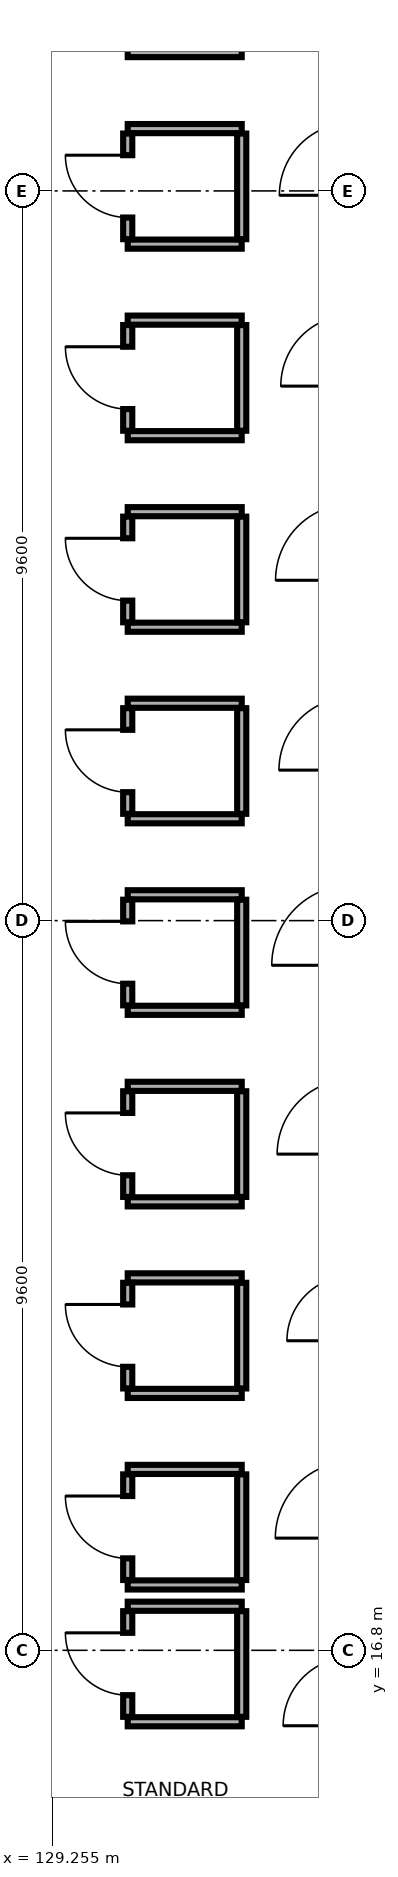
"""IFC4 building model, lengths in metres.
Left out: names, types, materials, properties, quantities, classifications, styles, units other than length and angle.
Written with IfcOpenShell. Run it as: python <this file> out.ifc"""

import sys

from ifc_helpers import new_model, si_unit, direction, frame, frame_2d, origin, place, context, subcontext, project, spatial, rectangle, extrude, element, fill, save


model = new_model("IFC4")
c1 = context("Model", 3, precision=1e-05, world=origin(), true_north=direction((0.0, 1.0)))
c2 = subcontext(c1, "Body", "Model", "MODEL_VIEW")
j1 = project(units=[si_unit("LENGTHUNIT", "METRE"), si_unit("PLANEANGLEUNIT", "RADIAN")], contexts=[c1])
p1 = place(None, origin())
s1 = spatial("IfcSite", under=j1, at=p1, CompositionType="ELEMENT")
p2 = place(p1, origin())
s2 = spatial("IfcBuilding", under=s1, at=p2, CompositionType="ELEMENT")
p3 = place(p2, frame((0.0, 0.0, 14.7)))
s3 = spatial("IfcBuildingStorey", under=s2, at=p3, CompositionType="ELEMENT", Elevation=14.7)
p4 = place(p3, frame((127.916, 15.27, 0.0), z_axis=(0.0, 0.0, 1.0), x_axis=(0.707089356394, -0.707124205549, 0.0)))
e1 = element("IfcWall", 1, at=p4, inside=s3, PredefinedType="SOLIDWALL", context=c2, shape_type="SweptSolid", body=[
    extrude(rectangle(XDim=7.006, YDim=0.3, at=frame_2d((3.503, 0.0))), origin(), (0.0, 0.0, 1.0), 3.215),
])
p5 = place(p4, frame((4.746, 0.0, 0.8)))
e2 = element("IfcOpeningElement", 2, at=p5, cuts=e1, PredefinedType="OPENING", context=c2, shape_type="SweptSolid", body=[
    extrude(rectangle(XDim=1.6, YDim=1.5, at=frame_2d((0.8, 0.75))), frame((0.0, 0.16, 0.0), z_axis=(0.0, -1.0, 0.0), x_axis=(1.0, 0.0, 0.0)), (0.0, 0.0, 1.0), 0.32),
])
p6 = place(p4, frame((1.083, 0.0, 0.8)))
e3 = element("IfcOpeningElement", 3, at=p6, cuts=e1, PredefinedType="OPENING", context=c2, shape_type="SweptSolid", body=[
    extrude(rectangle(XDim=1.6, YDim=1.5, at=frame_2d((0.8, 0.75))), frame((0.0, 0.16, 0.0), z_axis=(0.0, -1.0, 0.0), x_axis=(1.0, 0.0, 0.0)), (0.0, 0.0, 1.0), 0.32),
])
p7 = place(p3, frame((133.2, 15.0, 0.0), z_axis=(0.0, 0.0, 1.0), x_axis=(-0.707106781187, -0.707106781187, 0.0)))
e4 = element("IfcWall", 4, at=p7, inside=s3, PredefinedType="PARTITIONING", context=c2, shape_type="SweptSolid", body=[
    extrude(rectangle(XDim=3.789, YDim=0.18, at=frame_2d((1.894, 0.0))), origin(), (0.0, 0.0, 1.0), 2.76),
])
for number, where, z_axis, x_axis in (
    (5, (130.25, 37.82, 0.0), (0.0, 0.0, 1.0), (1.0, 0.0, 0.0)),
    (6, (130.25, 35.3, 0.0), (0.0, 0.0, 1.0), (1.0, 0.0, 0.0)),
    (7, (130.25, 36.82, 0.0), (0.0, 0.0, 1.0), (1.0, 0.0, 0.0)),
):
    element("IfcWall", number, at=place(p3, frame(where, z_axis=z_axis, x_axis=x_axis)), inside=s3, PredefinedType="PARTITIONING", context=c2, shape_type="SweptSolid", body=[
        extrude(rectangle(XDim=1.5, YDim=0.12, at=frame_2d((0.75, 0.0))), origin(), (0.0, 0.0, 1.0), 3.215),
    ])
p8 = place(p3, frame((130.25, 35.365, 0.0), z_axis=(0.0, 0.0, 1.0), x_axis=(0.0, 1.0, 0.0)))
e8 = element("IfcWall", 8, at=p8, inside=s3, PredefinedType="PARTITIONING", context=c2, shape_type="SweptSolid", body=[
    extrude(rectangle(XDim=1.39, YDim=0.12, at=frame_2d((0.695, 0.0))), origin(), (0.0, 0.0, 1.0), 3.215),
])
p9 = place(p8, frame((0.285, 0.0, 0.0)))
e9 = element("IfcOpeningElement", 9, at=p9, cuts=e8, PredefinedType="OPENING", context=c2, shape_type="SweptSolid", body=[
    extrude(rectangle(XDim=0.82, YDim=2.08, at=frame_2d((0.41, 1.04))), frame((0.0, 0.07, 0.0), z_axis=(0.0, -1.0, 0.0), x_axis=(1.0, 0.0, 0.0)), (0.0, 0.0, 1.0), 0.14),
])
p10 = place(p3, frame((131.75, 35.365, 0.0), z_axis=(0.0, 0.0, 1.0), x_axis=(0.0, 1.0, 0.0)))
e10 = element("IfcWall", 10, at=p10, inside=s3, PredefinedType="PARTITIONING", context=c2, shape_type="SweptSolid", body=[
    extrude(rectangle(XDim=1.39, YDim=0.12, at=frame_2d((0.695, 0.0))), origin(), (0.0, 0.0, 1.0), 3.215),
])
for number, where, z_axis, x_axis in (
    (11, (130.25, 32.78, 0.0), (0.0, 0.0, 1.0), (1.0, 0.0, 0.0)),
    (12, (130.25, 34.3, 0.0), (0.0, 0.0, 1.0), (1.0, 0.0, 0.0)),
):
    element("IfcWall", number, at=place(p3, frame(where, z_axis=z_axis, x_axis=x_axis)), inside=s3, PredefinedType="PARTITIONING", context=c2, shape_type="SweptSolid", body=[
        extrude(rectangle(XDim=1.5, YDim=0.12, at=frame_2d((0.75, 0.0))), origin(), (0.0, 0.0, 1.0), 3.215),
    ])
p11 = place(p3, frame((130.25, 32.845, 0.0), z_axis=(0.0, 0.0, 1.0), x_axis=(0.0, 1.0, 0.0)))
e13 = element("IfcWall", 13, at=p11, inside=s3, PredefinedType="PARTITIONING", context=c2, shape_type="SweptSolid", body=[
    extrude(rectangle(XDim=1.39, YDim=0.12, at=frame_2d((0.695, 0.0))), origin(), (0.0, 0.0, 1.0), 3.215),
])
p12 = place(p11, frame((0.285, 0.0, 0.0)))
e14 = element("IfcOpeningElement", 14, at=p12, cuts=e13, PredefinedType="OPENING", context=c2, shape_type="SweptSolid", body=[
    extrude(rectangle(XDim=0.82, YDim=2.08, at=frame_2d((0.41, 1.04))), frame((0.0, 0.07, 0.0), z_axis=(0.0, -1.0, 0.0), x_axis=(1.0, 0.0, 0.0)), (0.0, 0.0, 1.0), 0.14),
])
p13 = place(p3, frame((131.75, 32.845, 0.0), z_axis=(0.0, 0.0, 1.0), x_axis=(0.0, 1.0, 0.0)))
e15 = element("IfcWall", 15, at=p13, inside=s3, PredefinedType="PARTITIONING", context=c2, shape_type="SweptSolid", body=[
    extrude(rectangle(XDim=1.39, YDim=0.12, at=frame_2d((0.695, 0.0))), origin(), (0.0, 0.0, 1.0), 3.215),
])
for number, where, z_axis, x_axis in (
    (16, (130.25, 30.26, 0.0), (0.0, 0.0, 1.0), (1.0, 0.0, 0.0)),
    (17, (130.25, 31.78, 0.0), (0.0, 0.0, 1.0), (1.0, 0.0, 0.0)),
):
    element("IfcWall", number, at=place(p3, frame(where, z_axis=z_axis, x_axis=x_axis)), inside=s3, PredefinedType="PARTITIONING", context=c2, shape_type="SweptSolid", body=[
        extrude(rectangle(XDim=1.5, YDim=0.12, at=frame_2d((0.75, 0.0))), origin(), (0.0, 0.0, 1.0), 3.215),
    ])
p14 = place(p3, frame((130.25, 30.325, 0.0), z_axis=(0.0, 0.0, 1.0), x_axis=(0.0, 1.0, 0.0)))
e18 = element("IfcWall", 18, at=p14, inside=s3, PredefinedType="PARTITIONING", context=c2, shape_type="SweptSolid", body=[
    extrude(rectangle(XDim=1.39, YDim=0.12, at=frame_2d((0.695, 0.0))), origin(), (0.0, 0.0, 1.0), 2.75),
])
p15 = place(p14, frame((0.285, 0.0, 0.0)))
e19 = element("IfcOpeningElement", 19, at=p15, cuts=e18, PredefinedType="OPENING", context=c2, shape_type="SweptSolid", body=[
    extrude(rectangle(XDim=0.82, YDim=2.08, at=frame_2d((0.41, 1.04))), frame((0.0, 0.07, 0.0), z_axis=(0.0, -1.0, 0.0), x_axis=(1.0, 0.0, 0.0)), (0.0, 0.0, 1.0), 0.14),
])
p16 = place(p3, frame((131.75, 30.325, 0.0), z_axis=(0.0, 0.0, 1.0), x_axis=(0.0, 1.0, 0.0)))
e20 = element("IfcWall", 20, at=p16, inside=s3, PredefinedType="PARTITIONING", context=c2, shape_type="SweptSolid", body=[
    extrude(rectangle(XDim=1.39, YDim=0.12, at=frame_2d((0.695, 0.0))), origin(), (0.0, 0.0, 1.0), 2.75),
])
for number, where, z_axis, x_axis in (
    (21, (130.25, 27.74, 0.0), (0.0, 0.0, 1.0), (1.0, 0.0, 0.0)),
    (22, (130.25, 29.26, 0.0), (0.0, 0.0, 1.0), (1.0, 0.0, 0.0)),
):
    element("IfcWall", number, at=place(p3, frame(where, z_axis=z_axis, x_axis=x_axis)), inside=s3, PredefinedType="PARTITIONING", context=c2, shape_type="SweptSolid", body=[
        extrude(rectangle(XDim=1.5, YDim=0.12, at=frame_2d((0.75, 0.0))), origin(), (0.0, 0.0, 1.0), 3.215),
    ])
p17 = place(p3, frame((130.25, 27.805, 0.0), z_axis=(0.0, 0.0, 1.0), x_axis=(0.0, 1.0, 0.0)))
e23 = element("IfcWall", 23, at=p17, inside=s3, PredefinedType="PARTITIONING", context=c2, shape_type="SweptSolid", body=[
    extrude(rectangle(XDim=1.39, YDim=0.12, at=frame_2d((0.695, 0.0))), origin(), (0.0, 0.0, 1.0), 3.215),
])
p18 = place(p17, frame((0.285, 0.0, 0.0)))
e24 = element("IfcOpeningElement", 24, at=p18, cuts=e23, PredefinedType="OPENING", context=c2, shape_type="SweptSolid", body=[
    extrude(rectangle(XDim=0.82, YDim=2.08, at=frame_2d((0.41, 1.04))), frame((0.0, 0.07, 0.0), z_axis=(0.0, -1.0, 0.0), x_axis=(1.0, 0.0, 0.0)), (0.0, 0.0, 1.0), 0.14),
])
p19 = place(p3, frame((131.75, 27.805, 0.0), z_axis=(0.0, 0.0, 1.0), x_axis=(0.0, 1.0, 0.0)))
e25 = element("IfcWall", 25, at=p19, inside=s3, PredefinedType="PARTITIONING", context=c2, shape_type="SweptSolid", body=[
    extrude(rectangle(XDim=1.39, YDim=0.12, at=frame_2d((0.695, 0.0))), origin(), (0.0, 0.0, 1.0), 3.215),
])
for number, where, z_axis, x_axis in (
    (26, (130.25, 25.22, 0.0), (0.0, 0.0, 1.0), (1.0, 0.0, 0.0)),
    (27, (130.25, 26.74, 0.0), (0.0, 0.0, 1.0), (1.0, 0.0, 0.0)),
):
    element("IfcWall", number, at=place(p3, frame(where, z_axis=z_axis, x_axis=x_axis)), inside=s3, PredefinedType="PARTITIONING", context=c2, shape_type="SweptSolid", body=[
        extrude(rectangle(XDim=1.5, YDim=0.12, at=frame_2d((0.75, 0.0))), origin(), (0.0, 0.0, 1.0), 3.215),
    ])
p20 = place(p3, frame((130.25, 25.285, 0.0), z_axis=(0.0, 0.0, 1.0), x_axis=(0.0, 1.0, 0.0)))
e28 = element("IfcWall", 28, at=p20, inside=s3, PredefinedType="PARTITIONING", context=c2, shape_type="SweptSolid", body=[
    extrude(rectangle(XDim=1.39, YDim=0.12, at=frame_2d((0.695, 0.0))), origin(), (0.0, 0.0, 1.0), 3.215),
])
p21 = place(p20, frame((0.285, 0.0, 0.0)))
e29 = element("IfcOpeningElement", 29, at=p21, cuts=e28, PredefinedType="OPENING", context=c2, shape_type="SweptSolid", body=[
    extrude(rectangle(XDim=0.82, YDim=2.08, at=frame_2d((0.41, 1.04))), frame((0.0, 0.07, 0.0), z_axis=(0.0, -1.0, 0.0), x_axis=(1.0, 0.0, 0.0)), (0.0, 0.0, 1.0), 0.14),
])
p22 = place(p3, frame((131.75, 25.285, 0.0), z_axis=(0.0, 0.0, 1.0), x_axis=(0.0, 1.0, 0.0)))
e30 = element("IfcWall", 30, at=p22, inside=s3, PredefinedType="PARTITIONING", context=c2, shape_type="SweptSolid", body=[
    extrude(rectangle(XDim=1.39, YDim=0.12, at=frame_2d((0.695, 0.0))), origin(), (0.0, 0.0, 1.0), 3.215),
])
p23 = place(p3, frame((130.25, 22.7, 0.0), z_axis=(0.0, 0.0, 1.0), x_axis=(1.0, 0.0, 0.0)))
e31 = element("IfcWall", 31, at=p23, inside=s3, PredefinedType="PARTITIONING", context=c2, shape_type="SweptSolid", body=[
    extrude(rectangle(XDim=1.5, YDim=0.12, at=frame_2d((0.75, 0.0))), origin(), (0.0, 0.0, 1.0), 3.215),
])
p24 = place(p3, frame((130.25, 24.22, 0.0), z_axis=(0.0, 0.0, 1.0), x_axis=(1.0, 0.0, 0.0)))
e32 = element("IfcWall", 32, at=p24, inside=s3, PredefinedType="PARTITIONING", context=c2, shape_type="SweptSolid", body=[
    extrude(rectangle(XDim=1.5, YDim=0.12, at=frame_2d((0.75, 0.0))), origin(), (0.0, 0.0, 1.0), 2.75),
])
p25 = place(p3, frame((130.25, 22.765, 0.0), z_axis=(0.0, 0.0, 1.0), x_axis=(0.0, 1.0, 0.0)))
e33 = element("IfcWall", 33, at=p25, inside=s3, PredefinedType="PARTITIONING", context=c2, shape_type="SweptSolid", body=[
    extrude(rectangle(XDim=1.39, YDim=0.12, at=frame_2d((0.695, 0.0))), origin(), (0.0, 0.0, 1.0), 2.75),
])
p26 = place(p25, frame((0.285, 0.0, 0.0)))
e34 = element("IfcOpeningElement", 34, at=p26, cuts=e33, PredefinedType="OPENING", context=c2, shape_type="SweptSolid", body=[
    extrude(rectangle(XDim=0.82, YDim=2.08, at=frame_2d((0.41, 1.04))), frame((0.0, 0.07, 0.0), z_axis=(0.0, -1.0, 0.0), x_axis=(1.0, 0.0, 0.0)), (0.0, 0.0, 1.0), 0.14),
])
p27 = place(p3, frame((131.75, 22.765, 0.0), z_axis=(0.0, 0.0, 1.0), x_axis=(0.0, 1.0, 0.0)))
e35 = element("IfcWall", 35, at=p27, inside=s3, PredefinedType="PARTITIONING", context=c2, shape_type="SweptSolid", body=[
    extrude(rectangle(XDim=1.39, YDim=0.12, at=frame_2d((0.695, 0.0))), origin(), (0.0, 0.0, 1.0), 2.75),
])
for number, where, z_axis, x_axis in (
    (36, (130.25, 20.18, 0.0), (0.0, 0.0, 1.0), (1.0, 0.0, 0.0)),
    (37, (130.25, 21.7, 0.0), (0.0, 0.0, 1.0), (1.0, 0.0, 0.0)),
):
    element("IfcWall", number, at=place(p3, frame(where, z_axis=z_axis, x_axis=x_axis)), inside=s3, PredefinedType="PARTITIONING", context=c2, shape_type="SweptSolid", body=[
        extrude(rectangle(XDim=1.5, YDim=0.12, at=frame_2d((0.75, 0.0))), origin(), (0.0, 0.0, 1.0), 3.215),
    ])
p28 = place(p3, frame((130.25, 20.245, 0.0), z_axis=(0.0, 0.0, 1.0), x_axis=(0.0, 1.0, 0.0)))
e38 = element("IfcWall", 38, at=p28, inside=s3, PredefinedType="PARTITIONING", context=c2, shape_type="SweptSolid", body=[
    extrude(rectangle(XDim=1.39, YDim=0.12, at=frame_2d((0.695, 0.0))), origin(), (0.0, 0.0, 1.0), 3.215),
])
p29 = place(p28, frame((0.285, 0.0, 0.0)))
e39 = element("IfcOpeningElement", 39, at=p29, cuts=e38, PredefinedType="OPENING", context=c2, shape_type="SweptSolid", body=[
    extrude(rectangle(XDim=0.82, YDim=2.08, at=frame_2d((0.41, 1.04))), frame((0.0, 0.07, 0.0), z_axis=(0.0, -1.0, 0.0), x_axis=(1.0, 0.0, 0.0)), (0.0, 0.0, 1.0), 0.14),
])
p30 = place(p3, frame((131.75, 20.245, 0.0), z_axis=(0.0, 0.0, 1.0), x_axis=(0.0, 1.0, 0.0)))
e40 = element("IfcWall", 40, at=p30, inside=s3, PredefinedType="PARTITIONING", context=c2, shape_type="SweptSolid", body=[
    extrude(rectangle(XDim=1.39, YDim=0.12, at=frame_2d((0.695, 0.0))), origin(), (0.0, 0.0, 1.0), 3.215),
])
for number, where, z_axis, x_axis in (
    (41, (130.25, 17.66, 0.0), (0.0, 0.0, 1.0), (1.0, 0.0, 0.0)),
    (42, (130.25, 19.18, 0.0), (0.0, 0.0, 1.0), (1.0, 0.0, 0.0)),
):
    element("IfcWall", number, at=place(p3, frame(where, z_axis=z_axis, x_axis=x_axis)), inside=s3, PredefinedType="PARTITIONING", context=c2, shape_type="SweptSolid", body=[
        extrude(rectangle(XDim=1.5, YDim=0.12, at=frame_2d((0.75, 0.0))), origin(), (0.0, 0.0, 1.0), 3.215),
    ])
p31 = place(p3, frame((130.25, 17.725, 0.0), z_axis=(0.0, 0.0, 1.0), x_axis=(0.0, 1.0, 0.0)))
e43 = element("IfcWall", 43, at=p31, inside=s3, PredefinedType="PARTITIONING", context=c2, shape_type="SweptSolid", body=[
    extrude(rectangle(XDim=1.39, YDim=0.12, at=frame_2d((0.695, 0.0))), origin(), (0.0, 0.0, 1.0), 3.215),
])
p32 = place(p31, frame((0.285, 0.0, 0.0)))
e44 = element("IfcOpeningElement", 44, at=p32, cuts=e43, PredefinedType="OPENING", context=c2, shape_type="SweptSolid", body=[
    extrude(rectangle(XDim=0.82, YDim=2.08, at=frame_2d((0.41, 1.04))), frame((0.0, 0.07, 0.0), z_axis=(0.0, -1.0, 0.0), x_axis=(1.0, 0.0, 0.0)), (0.0, 0.0, 1.0), 0.14),
])
p33 = place(p3, frame((131.75, 17.725, 0.0), z_axis=(0.0, 0.0, 1.0), x_axis=(0.0, 1.0, 0.0)))
e45 = element("IfcWall", 45, at=p33, inside=s3, PredefinedType="PARTITIONING", context=c2, shape_type="SweptSolid", body=[
    extrude(rectangle(XDim=1.39, YDim=0.12, at=frame_2d((0.695, 0.0))), origin(), (0.0, 0.0, 1.0), 3.215),
])
for number, where, z_axis, x_axis in (
    (46, (130.25, 15.86, 0.0), (0.0, 0.0, 1.0), (1.0, 0.0, 0.0)),
    (47, (130.25, 17.38, 0.0), (0.0, 0.0, 1.0), (1.0, 0.0, 0.0)),
):
    element("IfcWall", number, at=place(p3, frame(where, z_axis=z_axis, x_axis=x_axis)), inside=s3, PredefinedType="PARTITIONING", context=c2, shape_type="SweptSolid", body=[
        extrude(rectangle(XDim=1.5, YDim=0.12, at=frame_2d((0.75, 0.0))), origin(), (0.0, 0.0, 1.0), 3.215),
    ])
p34 = place(p3, frame((130.25, 15.925, 0.0), z_axis=(0.0, 0.0, 1.0), x_axis=(0.0, 1.0, 0.0)))
e48 = element("IfcWall", 48, at=p34, inside=s3, PredefinedType="PARTITIONING", context=c2, shape_type="SweptSolid", body=[
    extrude(rectangle(XDim=1.39, YDim=0.12, at=frame_2d((0.695, 0.0))), origin(), (0.0, 0.0, 1.0), 2.75),
])
p35 = place(p34, frame((0.285, 0.0, 0.0)))
e49 = element("IfcOpeningElement", 49, at=p35, cuts=e48, PredefinedType="OPENING", context=c2, shape_type="SweptSolid", body=[
    extrude(rectangle(XDim=0.82, YDim=2.08, at=frame_2d((0.41, 1.04))), frame((0.0, 0.07, 0.0), z_axis=(0.0, -1.0, 0.0), x_axis=(1.0, 0.0, 0.0)), (0.0, 0.0, 1.0), 0.14),
])
p36 = place(p3, frame((131.75, 15.925, 0.0), z_axis=(0.0, 0.0, 1.0), x_axis=(0.0, 1.0, 0.0)))
e50 = element("IfcWall", 50, at=p36, inside=s3, PredefinedType="PARTITIONING", context=c2, shape_type="SweptSolid", body=[
    extrude(rectangle(XDim=1.39, YDim=0.12, at=frame_2d((0.695, 0.0))), origin(), (0.0, 0.0, 1.0), 2.75),
])
p37 = place(p9, origin())
e51 = element("IfcDoor", 51, at=p37, inside=s3, OperationType="SINGLE_SWING_RIGHT", PredefinedType="DOOR", context=c2, shape_type="SweptSolid", body=[
    extrude(rectangle(XDim=0.82, YDim=2.08, at=frame_2d((0.41, 1.04))), frame((0.0, 0.025, 0.0), z_axis=(0.0, -1.0, 0.0), x_axis=(1.0, 0.0, 0.0)), (0.0, 0.0, 1.0), 0.05),
])
fill(e9, e51)
p38 = place(p12, origin())
e52 = element("IfcDoor", 52, at=p38, inside=s3, OperationType="SINGLE_SWING_RIGHT", PredefinedType="DOOR", context=c2, shape_type="SweptSolid", body=[
    extrude(rectangle(XDim=0.82, YDim=2.08, at=frame_2d((0.41, 1.04))), frame((0.0, 0.025, 0.0), z_axis=(0.0, -1.0, 0.0), x_axis=(1.0, 0.0, 0.0)), (0.0, 0.0, 1.0), 0.05),
])
fill(e14, e52)
p39 = place(p15, origin())
e53 = element("IfcDoor", 53, at=p39, inside=s3, OperationType="SINGLE_SWING_RIGHT", PredefinedType="DOOR", context=c2, shape_type="SweptSolid", body=[
    extrude(rectangle(XDim=0.82, YDim=2.08, at=frame_2d((0.41, 1.04))), frame((0.0, 0.025, 0.0), z_axis=(0.0, -1.0, 0.0), x_axis=(1.0, 0.0, 0.0)), (0.0, 0.0, 1.0), 0.05),
])
fill(e19, e53)
p40 = place(p18, origin())
e54 = element("IfcDoor", 54, at=p40, inside=s3, OperationType="SINGLE_SWING_RIGHT", PredefinedType="DOOR", context=c2, shape_type="SweptSolid", body=[
    extrude(rectangle(XDim=0.82, YDim=2.08, at=frame_2d((0.41, 1.04))), frame((0.0, 0.025, 0.0), z_axis=(0.0, -1.0, 0.0), x_axis=(1.0, 0.0, 0.0)), (0.0, 0.0, 1.0), 0.05),
])
fill(e24, e54)
p41 = place(p21, origin())
e55 = element("IfcDoor", 55, at=p41, inside=s3, OperationType="SINGLE_SWING_RIGHT", PredefinedType="DOOR", context=c2, shape_type="SweptSolid", body=[
    extrude(rectangle(XDim=0.82, YDim=2.08, at=frame_2d((0.41, 1.04))), frame((0.0, 0.025, 0.0), z_axis=(0.0, -1.0, 0.0), x_axis=(1.0, 0.0, 0.0)), (0.0, 0.0, 1.0), 0.05),
])
fill(e29, e55)
p42 = place(p26, origin())
e56 = element("IfcDoor", 56, at=p42, inside=s3, OperationType="SINGLE_SWING_RIGHT", PredefinedType="DOOR", context=c2, shape_type="SweptSolid", body=[
    extrude(rectangle(XDim=0.82, YDim=2.08, at=frame_2d((0.41, 1.04))), frame((0.0, 0.025, 0.0), z_axis=(0.0, -1.0, 0.0), x_axis=(1.0, 0.0, 0.0)), (0.0, 0.0, 1.0), 0.05),
])
fill(e34, e56)
p43 = place(p29, origin())
e57 = element("IfcDoor", 57, at=p43, inside=s3, OperationType="SINGLE_SWING_RIGHT", PredefinedType="DOOR", context=c2, shape_type="SweptSolid", body=[
    extrude(rectangle(XDim=0.82, YDim=2.08, at=frame_2d((0.41, 1.04))), frame((0.0, 0.025, 0.0), z_axis=(0.0, -1.0, 0.0), x_axis=(1.0, 0.0, 0.0)), (0.0, 0.0, 1.0), 0.05),
])
fill(e39, e57)
p44 = place(p32, origin())
e58 = element("IfcDoor", 58, at=p44, inside=s3, OperationType="SINGLE_SWING_RIGHT", PredefinedType="DOOR", context=c2, shape_type="SweptSolid", body=[
    extrude(rectangle(XDim=0.82, YDim=2.08, at=frame_2d((0.41, 1.04))), frame((0.0, 0.025, 0.0), z_axis=(0.0, -1.0, 0.0), x_axis=(1.0, 0.0, 0.0)), (0.0, 0.0, 1.0), 0.05),
])
fill(e44, e58)
p45 = place(p35, origin())
e59 = element("IfcDoor", 59, at=p45, inside=s3, OperationType="SINGLE_SWING_RIGHT", PredefinedType="DOOR", context=c2, shape_type="SweptSolid", body=[
    extrude(rectangle(XDim=0.82, YDim=2.08, at=frame_2d((0.41, 1.04))), frame((0.0, 0.025, 0.0), z_axis=(0.0, -1.0, 0.0), x_axis=(1.0, 0.0, 0.0)), (0.0, 0.0, 1.0), 0.05),
])
fill(e49, e59)
save(model, sys.argv[1])
